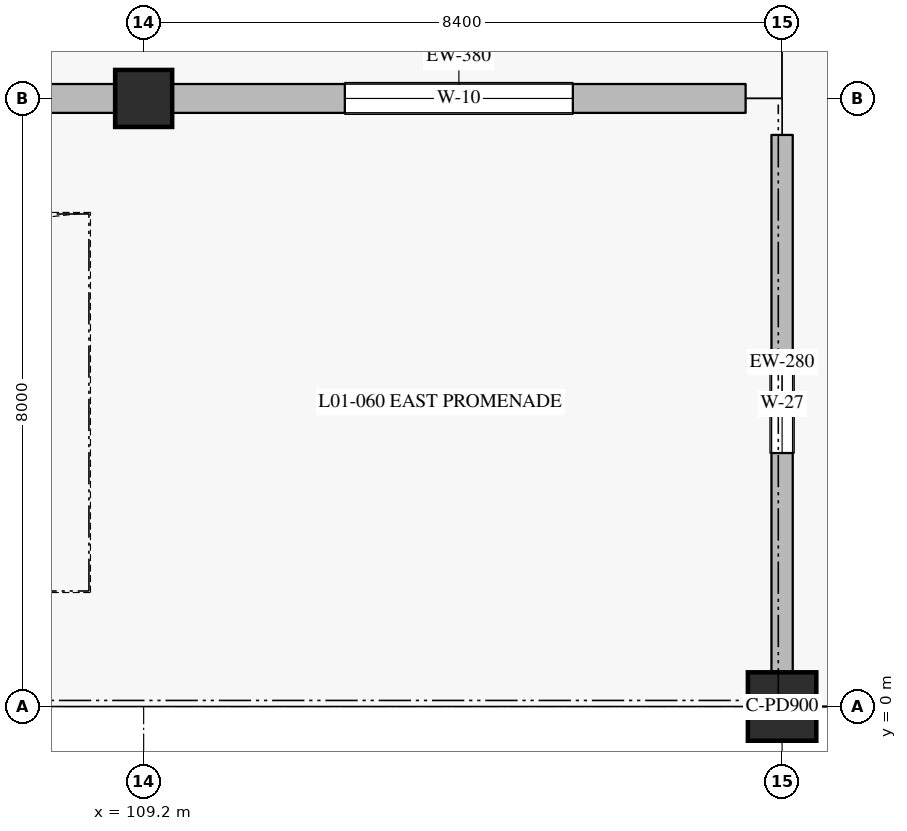
"""IFC4 building model, lengths in metres.
Left out: names, types, materials, properties, quantities, classifications, styles, units other than length and angle.
Written with IfcOpenShell. Run it as: python <this file> out.ifc"""

import sys

from ifc_helpers import new_model, si_unit, direction, frame, frame_2d, origin, origin_2d, place, context, subcontext, project, spatial, rectangle, circle, extrude, element, fill, save


model = new_model("IFC4")
c1 = context("Model", 3, precision=1e-05, world=origin(), true_north=direction((0.0, 1.0)))
c2 = subcontext(c1, "Body", "Model", "MODEL_VIEW")
j1 = project(units=[si_unit("LENGTHUNIT", "METRE"), si_unit("PLANEANGLEUNIT", "RADIAN")], contexts=[c1])
p1 = place(None, origin())
s1 = spatial("IfcSite", under=j1, at=p1, CompositionType="ELEMENT")
p2 = place(p1, origin())
s2 = spatial("IfcBuilding", under=s1, at=p2, CompositionType="ELEMENT")
p3 = place(p2, frame((0.0, 0.0, 6.0)))
s3 = spatial("IfcBuildingStorey", under=s2, at=p3, CompositionType="ELEMENT", Elevation=6.0)
p4 = place(p3, frame((109.2, 8.0, 0.0), z_axis=(0.0, 0.0, 1.0), x_axis=(1.0, 0.0, 0.0)))
e1 = element("IfcColumn", 1, at=p4, inside=s3, PredefinedType="COLUMN", context=c2, shape_type="SweptSolid", body=[
    extrude(rectangle(XDim=0.75, YDim=0.75, at=origin_2d()), origin(), (0.0, 0.0, 1.0), 5.4),
])
p5 = place(p3, frame((117.6, 0.0, 0.0), z_axis=(0.0, 0.0, 1.0), x_axis=(1.0, 0.0, 0.0)))
e2 = element("IfcColumn", 2, at=p5, inside=s3, PredefinedType="COLUMN", context=c2, shape_type="SweptSolid", body=[
    extrude(circle(Radius=0.45, at=origin_2d()), origin(), (0.0, 0.0, 1.0), 5.4),
])
p6 = place(p3, frame((117.12, 8.0, 0.0), z_axis=(0.0, 0.0, 1.0), x_axis=(-1.0, 0.0, 0.0)))
e3 = element("IfcWall", 3, at=p6, inside=s3, PredefinedType="SOLIDWALL", context=c2, shape_type="SweptSolid", body=[
    extrude(rectangle(XDim=7.545, YDim=0.38, at=frame_2d((3.772, 0.0))), origin(), (0.0, 0.0, 1.0), 5.1),
])
p7 = place(p6, frame((2.273, 0.0, 0.95)))
e4 = element("IfcOpeningElement", 4, at=p7, cuts=e3, PredefinedType="OPENING", context=c2, shape_type="SweptSolid", body=[
    extrude(rectangle(XDim=3.0, YDim=2.2, at=frame_2d((1.5, 1.1))), frame((0.0, 0.2, 0.0), z_axis=(0.0, -1.0, 0.0), x_axis=(1.0, 0.0, 0.0)), (0.0, 0.0, 1.0), 0.4),
])
p8 = place(p3, frame((108.825, 8.0, 0.0), z_axis=(0.0, 0.0, 1.0), x_axis=(-1.0, 0.0, 0.0)))
e5 = element("IfcWall", 5, at=p8, inside=s3, PredefinedType="SOLIDWALL", context=c2, shape_type="SweptSolid", body=[
    extrude(rectangle(XDim=7.65, YDim=0.38, at=frame_2d((3.825, 0.0))), origin(), (0.0, 0.0, 1.0), 4.45),
])
p9 = place(p8, frame((2.825, 0.0, 0.0)))
e6 = element("IfcOpeningElement", 6, at=p9, cuts=e5, PredefinedType="OPENING", context=c2, shape_type="SweptSolid", body=[
    extrude(rectangle(XDim=2.0, YDim=2.4, at=frame_2d((1.0, 1.2))), frame((0.0, 0.2, 0.0), z_axis=(0.0, -1.0, 0.0), x_axis=(1.0, 0.0, 0.0)), (0.0, 0.0, 1.0), 0.4),
])
p10 = place(p3, frame((117.6, 0.45, 0.0), z_axis=(0.0, 0.0, 1.0), x_axis=(0.0, 1.0, 0.0)))
e7 = element("IfcWall", 7, at=p10, inside=s3, PredefinedType="SOLIDWALL", context=c2, shape_type="SweptSolid", body=[
    extrude(rectangle(XDim=7.07, YDim=0.28, at=frame_2d((3.535, 0.0))), origin(), (0.0, 0.0, 1.0), 3.45),
])
p11 = place(p10, frame((2.885, 0.0, 0.75)))
e8 = element("IfcOpeningElement", 8, at=p11, cuts=e7, PredefinedType="OPENING", context=c2, shape_type="SweptSolid", body=[
    extrude(rectangle(XDim=1.3, YDim=1.65, at=frame_2d((0.65, 0.825))), frame((0.0, 0.15, 0.0), z_axis=(0.0, -1.0, 0.0), x_axis=(1.0, 0.0, 0.0)), (0.0, 0.0, 1.0), 0.3),
])
p12 = place(p7, origin())
e9 = element("IfcWindow", 9, at=p12, inside=s3, PartitioningType="DOUBLE_PANEL_VERTICAL", PredefinedType="WINDOW", context=c2, shape_type="SweptSolid", body=[
    extrude(rectangle(XDim=3.0, YDim=2.2, at=frame_2d((1.5, 1.1))), frame((0.0, 0.03, 0.0), z_axis=(0.0, -1.0, 0.0), x_axis=(1.0, 0.0, 0.0)), (0.0, 0.0, 1.0), 0.06),
])
fill(e4, e9)
p13 = place(p11, origin())
e10 = element("IfcWindow", 10, at=p13, inside=s3, PartitioningType="SINGLE_PANEL", PredefinedType="WINDOW", context=c2, shape_type="SweptSolid", body=[
    extrude(rectangle(XDim=1.3, YDim=1.65, at=frame_2d((0.65, 0.825))), frame((0.0, 0.03, 0.0), z_axis=(0.0, -1.0, 0.0), x_axis=(1.0, 0.0, 0.0)), (0.0, 0.0, 1.0), 0.06),
])
fill(e8, e10)
save(model, sys.argv[1])
